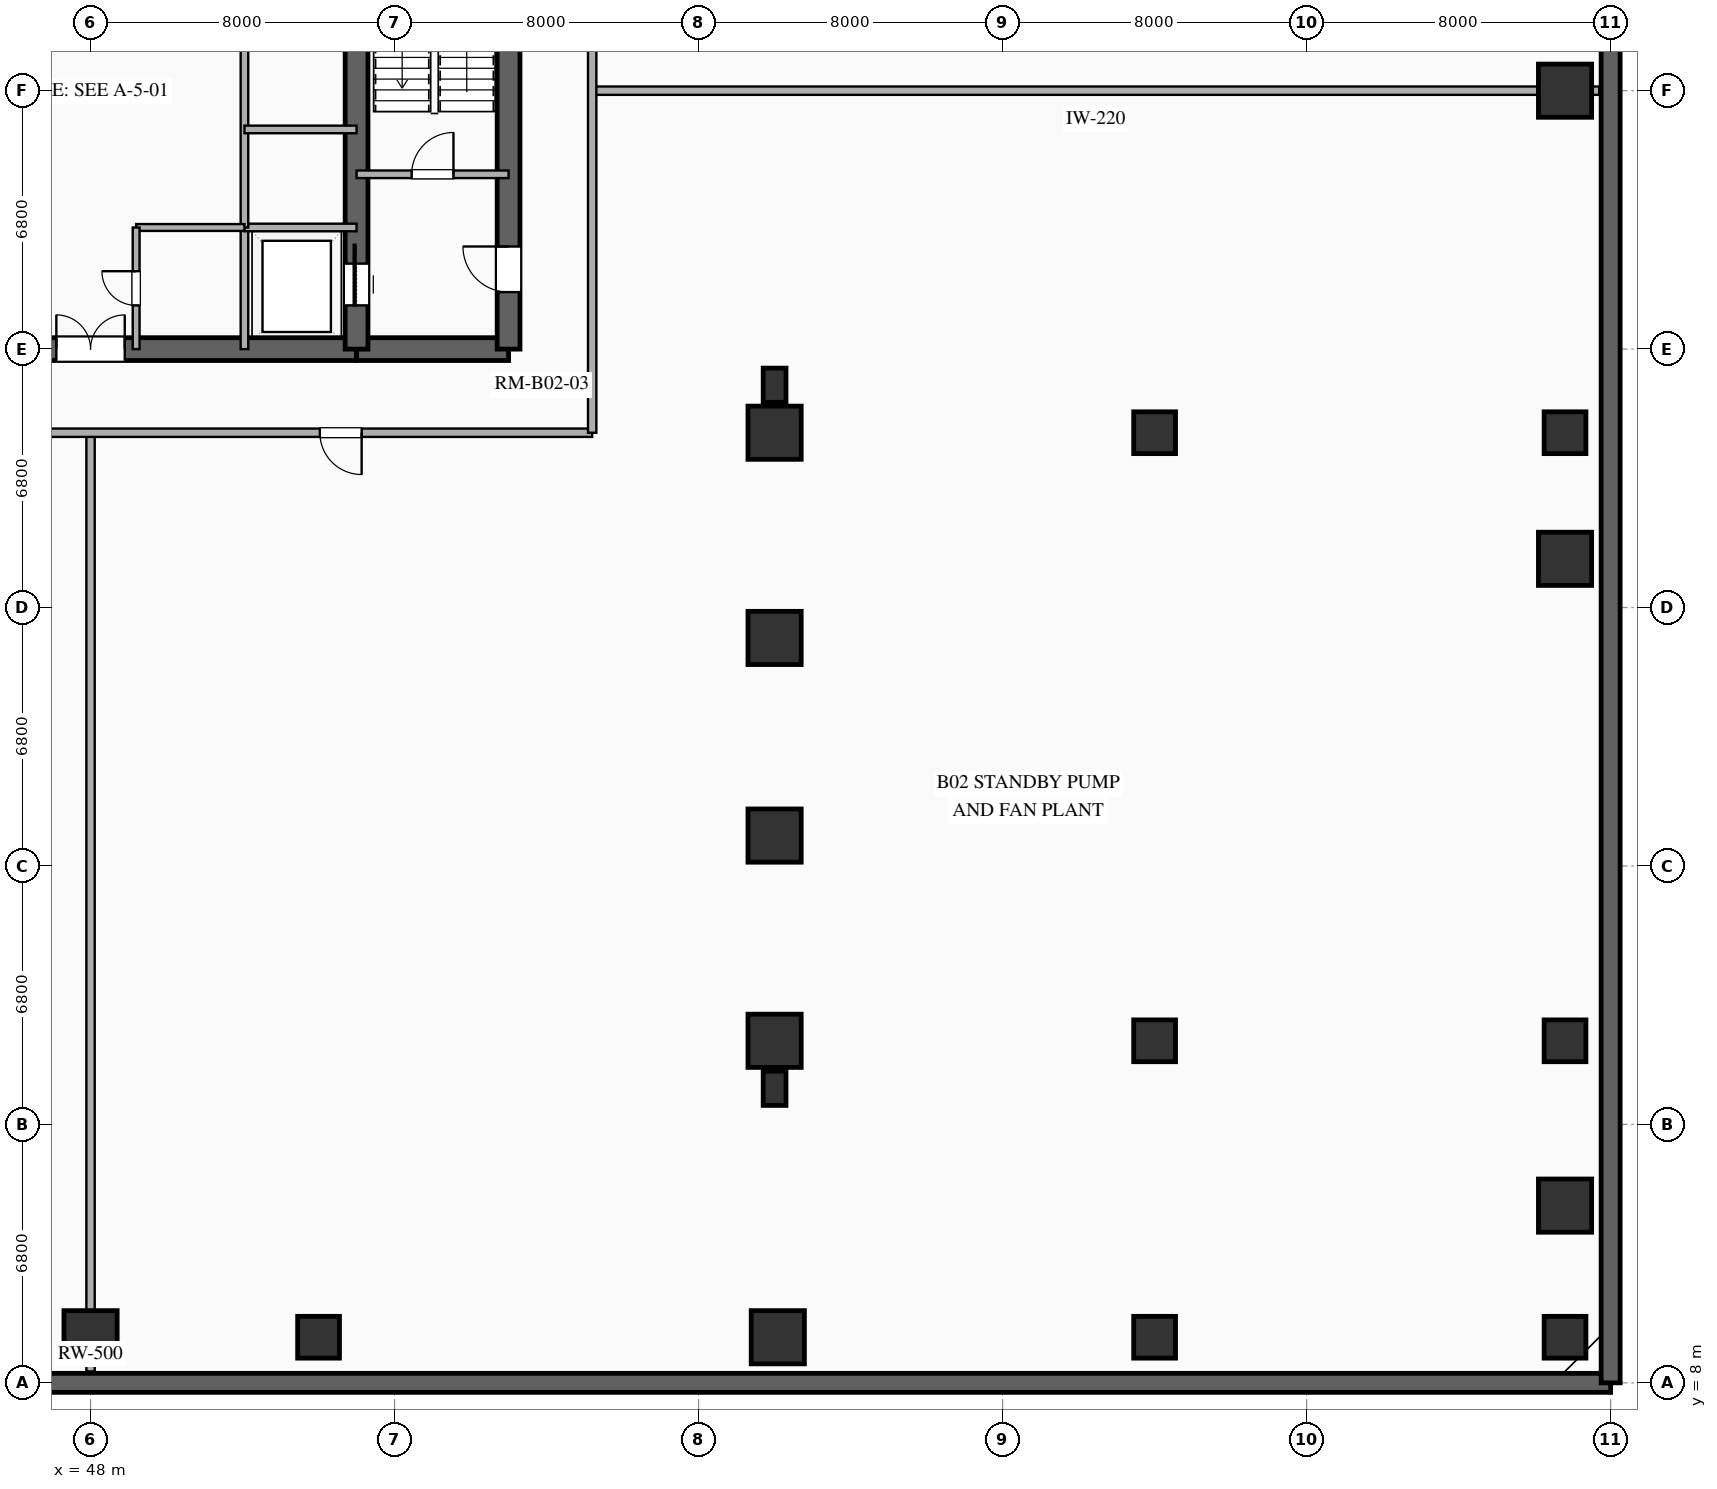
"""IFC4 building model, lengths in metres.
Left out: names, types, materials, properties, quantities, classifications, styles, units other than length and angle.
Written with IfcOpenShell. Run it as: python <this file> out.ifc"""

import sys

from ifc_helpers import new_model, si_unit, direction, frame, frame_2d, origin, origin_2d, place, context, subcontext, project, spatial, rectangle, extrude, element, fill, save


model = new_model("IFC4")
c1 = context("Model", 3, precision=1e-05, world=origin(), true_north=direction((0.0, 1.0)))
c2 = subcontext(c1, "Body", "Model", "MODEL_VIEW")
j1 = project(units=[si_unit("LENGTHUNIT", "METRE"), si_unit("PLANEANGLEUNIT", "RADIAN")], contexts=[c1])
p1 = place(None, origin())
s1 = spatial("IfcSite", under=j1, at=p1, CompositionType="ELEMENT")
p2 = place(p1, origin())
s2 = spatial("IfcBuilding", under=s1, at=p2, CompositionType="ELEMENT")
p3 = place(p2, frame((0.0, 0.0, -9.0)))
s3 = spatial("IfcBuildingStorey", under=s2, at=p3, CompositionType="ELEMENT", Elevation=-9.0)
p4 = place(p3, frame((8.0, 8.0, 0.0), z_axis=(0.0, 0.0, 1.0), x_axis=(1.0, 0.0, 0.0)))
e1 = element("IfcWall", 1, at=p4, inside=s3, PredefinedType="SOLIDWALL", context=c2, shape_type="SweptSolid", body=[
    extrude(rectangle(XDim=80.0, YDim=0.5, at=frame_2d((40.0, 0.0))), origin(), (0.0, 0.0, 1.0), 4.18),
])
p5 = place(p3, frame((88.0, 8.0, 0.0), z_axis=(0.0, 0.0, 1.0), x_axis=(0.0, 1.0, 0.0)))
e2 = element("IfcWall", 2, at=p5, inside=s3, PredefinedType="SOLIDWALL", context=c2, shape_type="SweptSolid", body=[
    extrude(rectangle(XDim=68.0, YDim=0.5, at=frame_2d((34.0, 0.0))), origin(), (0.0, 0.0, 1.0), 4.18),
])
p6 = place(p3, frame((41.0, 35.2, 0.0), z_axis=(0.0, 0.0, 1.0), x_axis=(1.0, 0.0, 0.0)))
e3 = element("IfcWall", 3, at=p6, inside=s3, PredefinedType="SHEAR", context=c2, shape_type="SweptSolid", body=[
    extrude(rectangle(XDim=14.0, YDim=0.6, at=frame_2d((7.0, 0.0))), origin(), (0.0, 0.0, 1.0), 4.18),
])
p7 = place(p6, frame((6.1, 0.0, 0.0)))
e4 = element("IfcOpeningElement", 4, at=p7, cuts=e3, PredefinedType="OPENING", context=c2, shape_type="SweptSolid", body=[
    extrude(rectangle(XDim=1.8, YDim=2.25, at=frame_2d((0.9, 1.125))), frame((0.0, 0.31, 0.0), z_axis=(0.0, -1.0, 0.0), x_axis=(1.0, 0.0, 0.0)), (0.0, 0.0, 1.0), 0.62),
])
p8 = place(p3, frame((55.0, 35.2, 0.0), z_axis=(0.0, 0.0, 1.0), x_axis=(1.0, 0.0, 0.0)))
e5 = element("IfcWall", 5, at=p8, inside=s3, PredefinedType="SHEAR", context=c2, shape_type="SweptSolid", body=[
    extrude(rectangle(XDim=4.0, YDim=0.6, at=frame_2d((2.0, 0.0))), origin(), (0.0, 0.0, 1.0), 4.18),
])
p9 = place(p3, frame((59.0, 35.2, 0.0), z_axis=(0.0, 0.0, 1.0), x_axis=(0.0, 1.0, 0.0)))
e6 = element("IfcWall", 6, at=p9, inside=s3, PredefinedType="SHEAR", context=c2, shape_type="SweptSolid", body=[
    extrude(rectangle(XDim=13.6, YDim=0.6, at=frame_2d((6.8, 0.0))), origin(), (0.0, 0.0, 1.0), 4.18),
])
p10 = place(p9, frame((1.5, 0.0, 0.0)))
e7 = element("IfcOpeningElement", 7, at=p10, cuts=e6, PredefinedType="OPENING", context=c2, shape_type="SweptSolid", body=[
    extrude(rectangle(XDim=1.2, YDim=2.15, at=frame_2d((0.6, 1.075))), frame((0.0, 0.31, 0.0), z_axis=(0.0, -1.0, 0.0), x_axis=(1.0, 0.0, 0.0)), (0.0, 0.0, 1.0), 0.62),
])
p11 = place(p3, frame((55.0, 35.2, 0.0), z_axis=(0.0, 0.0, 1.0), x_axis=(0.0, 1.0, 0.0)))
e8 = element("IfcWall", 8, at=p11, inside=s3, PredefinedType="SHEAR", context=c2, shape_type="SweptSolid", body=[
    extrude(rectangle(XDim=13.6, YDim=0.6, at=frame_2d((6.8, 0.0))), origin(), (0.0, 0.0, 1.0), 4.18),
])
p12 = place(p11, frame((1.15, 0.0, 0.0)))
e9 = element("IfcOpeningElement", 9, at=p12, cuts=e8, PredefinedType="OPENING", context=c2, shape_type="SweptSolid", body=[
    extrude(rectangle(XDim=1.1, YDim=2.2, at=frame_2d((0.55, 1.1))), frame((0.0, 0.31, 0.0), z_axis=(0.0, -1.0, 0.0), x_axis=(1.0, 0.0, 0.0)), (0.0, 0.0, 1.0), 0.62),
])
for number, where, z_axis, x_axis in (
    (10, (54.0, 9.2, 0.0), (0.0, 0.0, 1.0), (1.0, 0.0, 0.0)),
    (11, (76.0, 9.2, 0.0), (0.0, 0.0, 1.0), (1.0, 0.0, 0.0)),
    (12, (86.8, 9.2, 0.0), (0.0, 0.0, 1.0), (1.0, 0.0, 0.0)),
    (13, (86.8, 17.0, 0.0), (0.0, 0.0, 1.0), (1.0, 0.0, 0.0)),
    (14, (86.8, 33.0, 0.0), (0.0, 0.0, 1.0), (1.0, 0.0, 0.0)),
):
    element("IfcColumn", number, at=place(p3, frame(where, z_axis=z_axis, x_axis=x_axis)), inside=s3, PredefinedType="COLUMN", context=c2, shape_type="SweptSolid", body=[
        extrude(rectangle(XDim=1.1, YDim=1.1, at=origin_2d()), origin(), (0.0, 0.0, 1.0), 4.18),
    ])
p13 = place(p3, frame((66.0, 17.0, 0.0), z_axis=(0.0, 0.0, 1.0), x_axis=(1.0, 0.0, 0.0)))
e15 = element("IfcColumn", 15, at=p13, inside=s3, PredefinedType="COLUMN", context=c2, shape_type="SweptSolid", body=[
    extrude(rectangle(XDim=1.4, YDim=1.4, at=origin_2d()), origin(), (0.0, 0.0, 1.0), 4.18),
])
p14 = place(p3, frame((76.0, 17.0, 0.0), z_axis=(0.0, 0.0, 1.0), x_axis=(1.0, 0.0, 0.0)))
e16 = element("IfcColumn", 16, at=p14, inside=s3, PredefinedType="COLUMN", context=c2, shape_type="SweptSolid", body=[
    extrude(rectangle(XDim=1.1, YDim=1.1, at=origin_2d()), origin(), (0.0, 0.0, 1.0), 4.18),
])
p15 = place(p3, frame((66.0, 33.0, 0.0), z_axis=(0.0, 0.0, 1.0), x_axis=(1.0, 0.0, 0.0)))
e17 = element("IfcColumn", 17, at=p15, inside=s3, PredefinedType="COLUMN", context=c2, shape_type="SweptSolid", body=[
    extrude(rectangle(XDim=1.4, YDim=1.4, at=origin_2d()), origin(), (0.0, 0.0, 1.0), 4.18),
])
p16 = place(p3, frame((76.0, 33.0, 0.0), z_axis=(0.0, 0.0, 1.0), x_axis=(1.0, 0.0, 0.0)))
e18 = element("IfcColumn", 18, at=p16, inside=s3, PredefinedType="COLUMN", context=c2, shape_type="SweptSolid", body=[
    extrude(rectangle(XDim=1.1, YDim=1.1, at=origin_2d()), origin(), (0.0, 0.0, 1.0), 4.18),
])
for number, where, z_axis, x_axis in (
    (19, (86.8, 42.0, 0.0), (0.0, 0.0, 1.0), (1.0, 0.0, 0.0)),
    (20, (48.0, 9.2, 0.0), (0.0, 0.0, 1.0), (1.0, 0.0, 0.0)),
    (21, (66.084, 9.2, 0.0), (0.0, 0.0, 1.0), (1.0, 0.0, 0.0)),
    (22, (86.8, 12.663, 0.0), (0.0, 0.0, 1.0), (1.0, 0.0, 0.0)),
    (23, (86.8, 29.682, 0.0), (0.0, 0.0, 1.0), (1.0, 0.0, 0.0)),
    (24, (66.0, 22.4, 0.0), (0.0, 0.0, 1.0), (1.0, 0.0, 0.0)),
    (25, (66.0, 27.6, 0.0), (0.0, 0.0, 1.0), (1.0, 0.0, 0.0)),
):
    element("IfcColumn", number, at=place(p3, frame(where, z_axis=z_axis, x_axis=x_axis)), inside=s3, PredefinedType="COLUMN", context=c2, shape_type="SweptSolid", body=[
        extrude(rectangle(XDim=1.4, YDim=1.4, at=origin_2d()), origin(), (0.0, 0.0, 1.0), 4.18),
    ])
for number, where, z_axis, x_axis in (
    (26, (66.0, 15.75, 0.0), (0.0, 0.0, 1.0), (1.0, 0.0, 0.0)),
    (27, (66.0, 34.25, 0.0), (0.0, 0.0, 1.0), (1.0, 0.0, 0.0)),
):
    element("IfcColumn", number, at=place(p3, frame(where, z_axis=z_axis, x_axis=x_axis)), inside=s3, PredefinedType="PILASTER", context=c2, shape_type="SweptSolid", body=[
        extrude(rectangle(XDim=0.6, YDim=0.9, at=origin_2d()), origin(), (0.0, 0.0, 1.0), 4.18),
    ])
p17 = place(p3, frame((55.0, 39.8, 0.0), z_axis=(0.0, 0.0, 1.0), x_axis=(1.0, 0.0, 0.0)))
e28 = element("IfcWall", 28, at=p17, inside=s3, PredefinedType="SOLIDWALL", context=c2, shape_type="SweptSolid", body=[
    extrude(rectangle(XDim=4.0, YDim=0.2, at=frame_2d((2.0, 0.0))), origin(), (0.0, 0.0, 1.0), 3.38),
])
p18 = place(p17, frame((1.45, 0.0, 0.0)))
e29 = element("IfcOpeningElement", 29, at=p18, cuts=e28, PredefinedType="OPENING", context=c2, shape_type="SweptSolid", body=[
    extrude(rectangle(XDim=1.1, YDim=2.15, at=frame_2d((0.55, 1.075))), frame((0.0, 0.11, 0.0), z_axis=(0.0, -1.0, 0.0), x_axis=(1.0, 0.0, 0.0)), (0.0, 0.0, 1.0), 0.22),
])
p19 = place(p3, frame((52.05, 35.2, 0.0), z_axis=(0.0, 0.0, 1.0), x_axis=(0.0, 1.0, 0.0)))
e30 = element("IfcWall", 30, at=p19, inside=s3, PredefinedType="SOLIDWALL", context=c2, shape_type="SweptSolid", body=[
    extrude(rectangle(XDim=3.2, YDim=0.2, at=frame_2d((1.6, 0.0))), origin(), (0.0, 0.0, 1.0), 3.38),
])
p20 = place(p3, frame((52.05, 38.4, 0.0), z_axis=(0.0, 0.0, 1.0), x_axis=(1.0, 0.0, 0.0)))
e31 = element("IfcWall", 31, at=p20, inside=s3, PredefinedType="SOLIDWALL", context=c2, shape_type="SweptSolid", body=[
    extrude(rectangle(XDim=2.95, YDim=0.2, at=frame_2d((1.475, 0.0))), origin(), (0.0, 0.0, 1.0), 3.38),
])
p21 = place(p3, frame((52.05, 38.4, 0.0), z_axis=(0.0, 0.0, 1.0), x_axis=(0.0, 1.0, 0.0)))
e32 = element("IfcWall", 32, at=p21, inside=s3, PredefinedType="SOLIDWALL", context=c2, shape_type="SweptSolid", body=[
    extrude(rectangle(XDim=10.4, YDim=0.2, at=frame_2d((5.2, 0.0))), origin(), (0.0, 0.0, 1.0), 3.38),
])
p22 = place(p21, frame((8.2, 0.0, 0.0)))
e33 = element("IfcOpeningElement", 33, at=p22, cuts=e32, PredefinedType="OPENING", context=c2, shape_type="SweptSolid", body=[
    extrude(rectangle(XDim=1.2, YDim=2.2, at=frame_2d((0.6, 1.1))), frame((0.0, 0.11, 0.0), z_axis=(0.0, -1.0, 0.0), x_axis=(1.0, 0.0, 0.0)), (0.0, 0.0, 1.0), 0.22),
])
p23 = place(p3, frame((52.05, 40.98, 0.0), z_axis=(0.0, 0.0, 1.0), x_axis=(1.0, 0.0, 0.0)))
e34 = element("IfcWall", 34, at=p23, inside=s3, PredefinedType="SOLIDWALL", context=c2, shape_type="SweptSolid", body=[
    extrude(rectangle(XDim=2.95, YDim=0.2, at=frame_2d((1.475, 0.0))), origin(), (0.0, 0.0, 1.0), 3.38),
])
p24 = place(p3, frame((49.2, 38.4, 0.0), z_axis=(0.0, 0.0, 1.0), x_axis=(1.0, 0.0, 0.0)))
e35 = element("IfcWall", 35, at=p24, inside=s3, PredefinedType="PLUMBINGWALL", context=c2, shape_type="SweptSolid", body=[
    extrude(rectangle(XDim=2.85, YDim=0.18, at=frame_2d((1.425, 0.0))), origin(), (0.0, 0.0, 1.0), 3.38),
])
p25 = place(p3, frame((49.2, 35.2, 0.0), z_axis=(0.0, 0.0, 1.0), x_axis=(0.0, 1.0, 0.0)))
e36 = element("IfcWall", 36, at=p25, inside=s3, PredefinedType="PLUMBINGWALL", context=c2, shape_type="SweptSolid", body=[
    extrude(rectangle(XDim=3.2, YDim=0.18, at=frame_2d((1.6, 0.0))), origin(), (0.0, 0.0, 1.0), 3.38),
])
p26 = place(p25, frame((1.15, 0.0, 0.0)))
e37 = element("IfcOpeningElement", 37, at=p26, cuts=e36, PredefinedType="OPENING", context=c2, shape_type="SweptSolid", body=[
    extrude(rectangle(XDim=0.9, YDim=2.1, at=frame_2d((0.45, 1.05))), frame((0.0, 0.1, 0.0), z_axis=(0.0, -1.0, 0.0), x_axis=(1.0, 0.0, 0.0)), (0.0, 0.0, 1.0), 0.2),
])
p27 = place(p3, frame((87.7, 42.0, 0.0), z_axis=(0.0, 0.0, 1.0), x_axis=(-1.0, 0.0, 0.0)))
e38 = element("IfcWall", 38, at=p27, inside=s3, PredefinedType="SOLIDWALL", context=c2, shape_type="SweptSolid", body=[
    extrude(rectangle(XDim=26.5, YDim=0.22, at=frame_2d((13.25, 0.0))), origin(), (0.0, 0.0, 1.0), 3.38),
])
p28 = place(p3, frame((48.0, 33.0, 0.0), z_axis=(0.0, 0.0, 1.0), x_axis=(0.0, -1.0, 0.0)))
e39 = element("IfcWall", 39, at=p28, inside=s3, PredefinedType="SOLIDWALL", context=c2, shape_type="SweptSolid", body=[
    extrude(rectangle(XDim=24.7, YDim=0.22, at=frame_2d((12.35, 0.0))), origin(), (0.0, 0.0, 1.0), 3.38),
])
p29 = place(p3, frame((61.2, 33.0, 0.0), z_axis=(0.0, 0.0, 1.0), x_axis=(-1.0, 0.0, 0.0)))
e40 = element("IfcWall", 40, at=p29, inside=s3, PredefinedType="SOLIDWALL", context=c2, shape_type="SweptSolid", body=[
    extrude(rectangle(XDim=26.4, YDim=0.22, at=frame_2d((13.2, 0.0))), origin(), (0.0, 0.0, 1.0), 3.38),
])
p30 = place(p29, frame((19.234, 0.0, 0.0)))
e41 = element("IfcOpeningElement", 41, at=p30, cuts=e40, PredefinedType="OPENING", context=c2, shape_type="SweptSolid", body=[
    extrude(rectangle(XDim=1.1, YDim=2.15, at=frame_2d((0.55, 1.075))), frame((0.0, 0.12, 0.0), z_axis=(0.0, -1.0, 0.0), x_axis=(1.0, 0.0, 0.0)), (0.0, 0.0, 1.0), 0.24),
])
p31 = place(p29, frame((6.066, 0.0, 0.0)))
e42 = element("IfcOpeningElement", 42, at=p31, cuts=e40, PredefinedType="OPENING", context=c2, shape_type="SweptSolid", body=[
    extrude(rectangle(XDim=1.1, YDim=2.15, at=frame_2d((0.55, 1.075))), frame((0.0, 0.12, 0.0), z_axis=(0.0, -1.0, 0.0), x_axis=(1.0, 0.0, 0.0)), (0.0, 0.0, 1.0), 0.24),
])
p32 = place(p3, frame((61.2, 51.0, 0.0), z_axis=(0.0, 0.0, 1.0), x_axis=(0.0, -1.0, 0.0)))
e43 = element("IfcWall", 43, at=p32, inside=s3, PredefinedType="SOLIDWALL", context=c2, shape_type="SweptSolid", body=[
    extrude(rectangle(XDim=18.0, YDim=0.22, at=frame_2d((9.0, 0.0))), origin(), (0.0, 0.0, 1.0), 3.38),
])
p33 = place(p12, origin())
e44 = element("IfcDoor", 44, at=p33, inside=s3, OperationType="SLIDING_TO_RIGHT", PredefinedType="DOOR", context=c2, shape_type="SweptSolid", body=[
    extrude(rectangle(XDim=1.1, YDim=2.2, at=frame_2d((0.55, 1.1))), frame((0.0, 0.025, 0.0), z_axis=(0.0, -1.0, 0.0), x_axis=(1.0, 0.0, 0.0)), (0.0, 0.0, 1.0), 0.05),
])
fill(e9, e44)
p34 = place(p10, origin())
e45 = element("IfcDoor", 45, at=p34, inside=s3, OperationType="SINGLE_SWING_RIGHT", PredefinedType="DOOR", context=c2, shape_type="SweptSolid", body=[
    extrude(rectangle(XDim=1.2, YDim=2.15, at=frame_2d((0.6, 1.075))), frame((0.0, 0.025, 0.0), z_axis=(0.0, -1.0, 0.0), x_axis=(1.0, 0.0, 0.0)), (0.0, 0.0, 1.0), 0.05),
])
fill(e7, e45)
p35 = place(p7, origin())
e46 = element("IfcDoor", 46, at=p35, inside=s3, OperationType="DOUBLE_DOOR_SINGLE_SWING", PredefinedType="DOOR", context=c2, shape_type="SweptSolid", body=[
    extrude(rectangle(XDim=1.8, YDim=2.25, at=frame_2d((0.9, 1.125))), frame((0.0, 0.025, 0.0), z_axis=(0.0, -1.0, 0.0), x_axis=(1.0, 0.0, 0.0)), (0.0, 0.0, 1.0), 0.05),
])
fill(e4, e46)
p36 = place(p18, origin())
e47 = element("IfcDoor", 47, at=p36, inside=s3, OperationType="SINGLE_SWING_RIGHT", PredefinedType="DOOR", context=c2, shape_type="SweptSolid", body=[
    extrude(rectangle(XDim=1.1, YDim=2.15, at=frame_2d((0.55, 1.075))), frame((0.0, 0.025, 0.0), z_axis=(0.0, -1.0, 0.0), x_axis=(1.0, 0.0, 0.0)), (0.0, 0.0, 1.0), 0.05),
])
fill(e29, e47)
p37 = place(p26, origin())
e48 = element("IfcDoor", 48, at=p37, inside=s3, OperationType="SINGLE_SWING_RIGHT", PredefinedType="DOOR", context=c2, shape_type="SweptSolid", body=[
    extrude(rectangle(XDim=0.9, YDim=2.1, at=frame_2d((0.45, 1.05))), frame((0.0, 0.025, 0.0), z_axis=(0.0, -1.0, 0.0), x_axis=(1.0, 0.0, 0.0)), (0.0, 0.0, 1.0), 0.05),
])
fill(e37, e48)
p38 = place(p31, origin())
e49 = element("IfcDoor", 49, at=p38, inside=s3, OperationType="SINGLE_SWING_LEFT", PredefinedType="DOOR", context=c2, shape_type="SweptSolid", body=[
    extrude(rectangle(XDim=1.1, YDim=2.15, at=frame_2d((0.55, 1.075))), frame((0.0, 0.025, 0.0), z_axis=(0.0, -1.0, 0.0), x_axis=(1.0, 0.0, 0.0)), (0.0, 0.0, 1.0), 0.05),
])
fill(e42, e49)
save(model, sys.argv[1])
